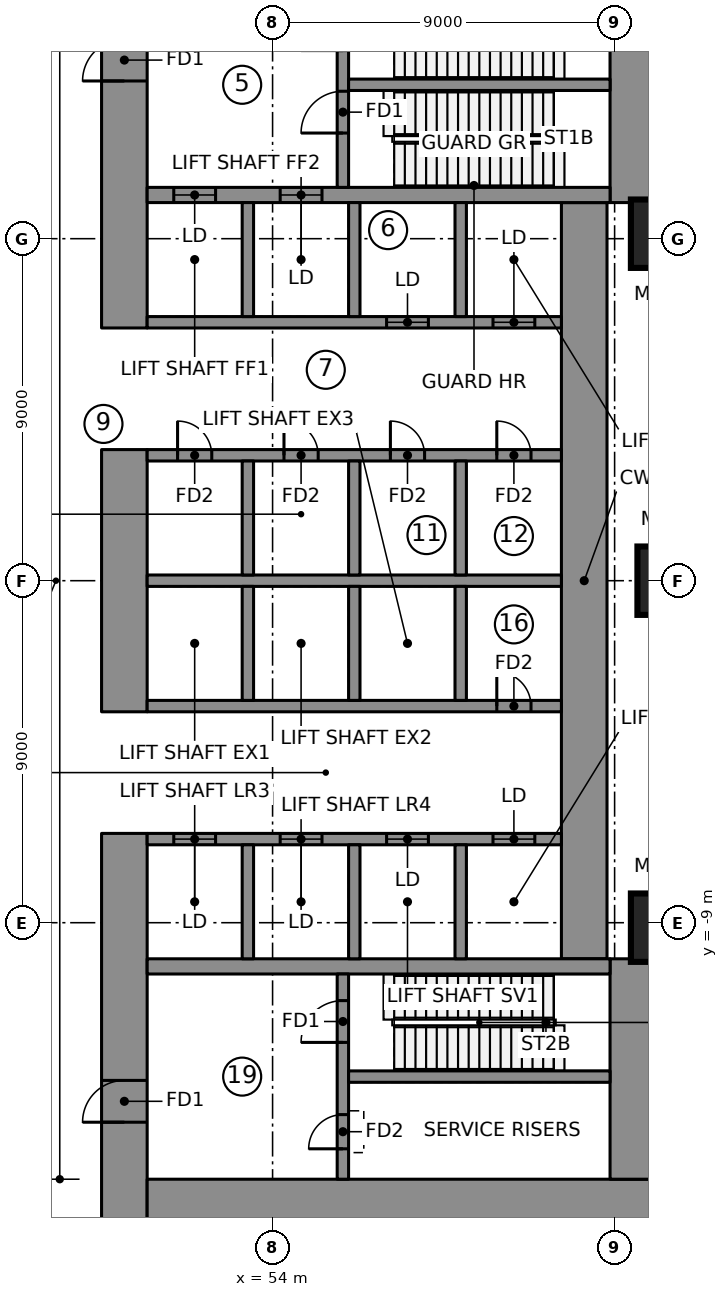
"""IFC4 building model, lengths in metres.
Left out: names, types, materials, properties, quantities, classifications, styles, units other than length and angle.
Written with IfcOpenShell. Run it as: python <this file> out.ifc"""

import sys

from ifc_helpers import new_model, si_unit, direction, frame, frame_2d, origin, origin_2d, place, context, subcontext, project, spatial, rectangle, extrude, element, fill, save


model = new_model("IFC4")
c1 = context("Model", 3, precision=1e-05, world=origin(), true_north=direction((0.0, 1.0)))
c2 = subcontext(c1, "Body", "Model", "MODEL_VIEW")
j1 = project(units=[si_unit("LENGTHUNIT", "METRE"), si_unit("PLANEANGLEUNIT", "RADIAN")], contexts=[c1])
p1 = place(None, origin())
s1 = spatial("IfcSite", under=j1, at=p1, CompositionType="ELEMENT")
p2 = place(p1, origin())
s2 = spatial("IfcBuilding", under=s1, at=p2, CompositionType="ELEMENT")
p3 = place(p2, frame((0.0, 0.0, 13.5)))
s3 = spatial("IfcBuildingStorey", under=s2, at=p3, CompositionType="ELEMENT", Elevation=13.5)
p4 = place(p3, frame((50.1, 6.65, 0.0), z_axis=(0.0, 0.0, 1.0), x_axis=(0.0, 1.0, 0.0)))
e1 = element("IfcWall", 1, at=p4, inside=s3, PredefinedType="SHEAR", context=c2, shape_type="SweptSolid", body=[
    extrude(rectangle(XDim=10.3, YDim=1.2, at=frame_2d((5.15, 0.0))), origin(), (0.0, 0.0, 1.0), 5.5),
])
p5 = place(p4, frame((6.5, 0.0, 0.0)))
e2 = element("IfcOpeningElement", 2, at=p5, cuts=e1, PredefinedType="OPENING", context=c2, shape_type="SweptSolid", body=[
    extrude(rectangle(XDim=1.1, YDim=2.1, at=frame_2d((0.55, 1.05))), frame((0.0, 0.61, 0.0), z_axis=(0.0, -1.0, 0.0), x_axis=(1.0, 0.0, 0.0)), (0.0, 0.0, 1.0), 1.22),
])
p6 = place(p3, frame((50.1, -3.45, 0.0), z_axis=(0.0, 0.0, 1.0), x_axis=(0.0, 1.0, 0.0)))
e3 = element("IfcWall", 3, at=p6, inside=s3, PredefinedType="SHEAR", context=c2, shape_type="SweptSolid", body=[
    extrude(rectangle(XDim=6.9, YDim=1.2, at=frame_2d((3.45, 0.0))), origin(), (0.0, 0.0, 1.0), 5.5),
])
p7 = place(p3, frame((50.1, -16.95, 0.0), z_axis=(0.0, 0.0, 1.0), x_axis=(0.0, 1.0, 0.0)))
e4 = element("IfcWall", 4, at=p7, inside=s3, PredefinedType="SHEAR", context=c2, shape_type="SweptSolid", body=[
    extrude(rectangle(XDim=10.3, YDim=1.2, at=frame_2d((5.15, 0.0))), origin(), (0.0, 0.0, 1.0), 5.5),
])
p8 = place(p7, frame((2.7, 0.0, 0.0)))
e5 = element("IfcOpeningElement", 5, at=p8, cuts=e4, PredefinedType="OPENING", context=c2, shape_type="SweptSolid", body=[
    extrude(rectangle(XDim=1.1, YDim=2.1, at=frame_2d((0.55, 1.05))), frame((0.0, 0.61, 0.0), z_axis=(0.0, -1.0, 0.0), x_axis=(1.0, 0.0, 0.0)), (0.0, 0.0, 1.0), 1.22),
])
p9 = place(p3, frame((50.7, -16.35, 0.0), z_axis=(0.0, 0.0, 1.0), x_axis=(1.0, 0.0, 0.0)))
e6 = element("IfcWall", 6, at=p9, inside=s3, PredefinedType="SHEAR", context=c2, shape_type="SweptSolid", body=[
    extrude(rectangle(XDim=13.38, YDim=1.2, at=frame_2d((6.69, 0.0))), origin(), (0.0, 0.0, 1.0), 5.5),
])
for number, where, z_axis, x_axis in (
    (7, (63.48, 9.95, 0.0), (0.0, 0.0, 1.0), (0.0, 1.0, 0.0)),
    (8, (63.48, -15.75, 0.0), (0.0, 0.0, 1.0), (0.0, 1.0, 0.0)),
):
    element("IfcWall", number, at=place(p3, frame(where, z_axis=z_axis, x_axis=x_axis)), inside=s3, PredefinedType="SHEAR", context=c2, shape_type="SweptSolid", body=[
        extrude(rectangle(XDim=5.8, YDim=1.2, at=frame_2d((2.9, 0.0))), origin(), (0.0, 0.0, 1.0), 5.5),
    ])
p10 = place(p3, frame((62.2, -9.95, 0.0), z_axis=(0.0, 0.0, 1.0), x_axis=(0.0, 1.0, 0.0)))
e9 = element("IfcWall", 9, at=p10, inside=s3, PredefinedType="SHEAR", context=c2, shape_type="SweptSolid", body=[
    extrude(rectangle(XDim=19.9, YDim=1.2, at=frame_2d((9.95, 0.0))), origin(), (0.0, 0.0, 1.0), 5.5),
])
p11 = place(p3, frame((50.7, 10.15, 0.0), z_axis=(0.0, 0.0, 1.0), x_axis=(1.0, 0.0, 0.0)))
e10 = element("IfcWall", 10, at=p11, inside=s3, PredefinedType="SHEAR", context=c2, shape_type="SweptSolid", body=[
    extrude(rectangle(XDim=12.18, YDim=0.4, at=frame_2d((6.09, 0.0))), origin(), (0.0, 0.0, 1.0), 5.5),
])
p12 = place(p11, frame((0.7, 0.0, 0.0)))
e11 = element("IfcOpeningElement", 11, at=p12, cuts=e10, PredefinedType="OPENING", context=c2, shape_type="SweptSolid", body=[
    extrude(rectangle(XDim=1.1, YDim=2.1, at=frame_2d((0.55, 1.05))), frame((0.0, 0.21, 0.0), z_axis=(0.0, -1.0, 0.0), x_axis=(1.0, 0.0, 0.0)), (0.0, 0.0, 1.0), 0.42),
])
p13 = place(p11, frame((3.5, 0.0, 0.0)))
e12 = element("IfcOpeningElement", 12, at=p13, cuts=e10, PredefinedType="OPENING", context=c2, shape_type="SweptSolid", body=[
    extrude(rectangle(XDim=1.1, YDim=2.1, at=frame_2d((0.55, 1.05))), frame((0.0, 0.21, 0.0), z_axis=(0.0, -1.0, 0.0), x_axis=(1.0, 0.0, 0.0)), (0.0, 0.0, 1.0), 0.42),
])
p14 = place(p3, frame((50.7, -10.15, 0.0), z_axis=(0.0, 0.0, 1.0), x_axis=(1.0, 0.0, 0.0)))
e13 = element("IfcWall", 13, at=p14, inside=s3, PredefinedType="SHEAR", context=c2, shape_type="SweptSolid", body=[
    extrude(rectangle(XDim=12.18, YDim=0.4, at=frame_2d((6.09, 0.0))), origin(), (0.0, 0.0, 1.0), 5.5),
])
p15 = place(p3, frame((50.7, 0.0, 0.0), z_axis=(0.0, 0.0, 1.0), x_axis=(1.0, 0.0, 0.0)))
e14 = element("IfcWall", 14, at=p15, inside=s3, PredefinedType="SHEAR", context=c2, shape_type="SweptSolid", body=[
    extrude(rectangle(XDim=10.9, YDim=0.3, at=frame_2d((5.45, 0.0))), origin(), (0.0, 0.0, 1.0), 5.5),
])
p16 = place(p3, frame((50.7, 3.3, 0.0), z_axis=(0.0, 0.0, 1.0), x_axis=(1.0, 0.0, 0.0)))
e15 = element("IfcWall", 15, at=p16, inside=s3, PredefinedType="SHEAR", context=c2, shape_type="SweptSolid", body=[
    extrude(rectangle(XDim=10.9, YDim=0.3, at=frame_2d((5.45, 0.0))), origin(), (0.0, 0.0, 1.0), 5.5),
])
p17 = place(p16, frame((0.8, 0.0, 0.0)))
e16 = element("IfcOpeningElement", 16, at=p17, cuts=e15, PredefinedType="OPENING", context=c2, shape_type="SweptSolid", body=[
    extrude(rectangle(XDim=0.9, YDim=2.1, at=frame_2d((0.45, 1.05))), frame((0.0, 0.16, 0.0), z_axis=(0.0, -1.0, 0.0), x_axis=(1.0, 0.0, 0.0)), (0.0, 0.0, 1.0), 0.32),
])
p18 = place(p16, frame((3.6, 0.0, 0.0)))
e17 = element("IfcOpeningElement", 17, at=p18, cuts=e15, PredefinedType="OPENING", context=c2, shape_type="SweptSolid", body=[
    extrude(rectangle(XDim=0.9, YDim=2.1, at=frame_2d((0.45, 1.05))), frame((0.0, 0.16, 0.0), z_axis=(0.0, -1.0, 0.0), x_axis=(1.0, 0.0, 0.0)), (0.0, 0.0, 1.0), 0.32),
])
p19 = place(p16, frame((6.4, 0.0, 0.0)))
e18 = element("IfcOpeningElement", 18, at=p19, cuts=e15, PredefinedType="OPENING", context=c2, shape_type="SweptSolid", body=[
    extrude(rectangle(XDim=0.9, YDim=2.1, at=frame_2d((0.45, 1.05))), frame((0.0, 0.16, 0.0), z_axis=(0.0, -1.0, 0.0), x_axis=(1.0, 0.0, 0.0)), (0.0, 0.0, 1.0), 0.32),
])
p20 = place(p16, frame((9.2, 0.0, 0.0)))
e19 = element("IfcOpeningElement", 19, at=p20, cuts=e15, PredefinedType="OPENING", context=c2, shape_type="SweptSolid", body=[
    extrude(rectangle(XDim=0.9, YDim=2.1, at=frame_2d((0.45, 1.05))), frame((0.0, 0.16, 0.0), z_axis=(0.0, -1.0, 0.0), x_axis=(1.0, 0.0, 0.0)), (0.0, 0.0, 1.0), 0.32),
])
p21 = place(p3, frame((50.7, 6.8, 0.0), z_axis=(0.0, 0.0, 1.0), x_axis=(1.0, 0.0, 0.0)))
e20 = element("IfcWall", 20, at=p21, inside=s3, PredefinedType="SHEAR", context=c2, shape_type="SweptSolid", body=[
    extrude(rectangle(XDim=10.9, YDim=0.3, at=frame_2d((5.45, 0.0))), origin(), (0.0, 0.0, 1.0), 5.5),
])
p22 = place(p21, frame((6.3, 0.0, 0.0)))
e21 = element("IfcOpeningElement", 21, at=p22, cuts=e20, PredefinedType="OPENING", context=c2, shape_type="SweptSolid", body=[
    extrude(rectangle(XDim=1.1, YDim=2.1, at=frame_2d((0.55, 1.05))), frame((0.0, 0.16, 0.0), z_axis=(0.0, -1.0, 0.0), x_axis=(1.0, 0.0, 0.0)), (0.0, 0.0, 1.0), 0.32),
])
p23 = place(p21, frame((9.1, 0.0, 0.0)))
e22 = element("IfcOpeningElement", 22, at=p23, cuts=e20, PredefinedType="OPENING", context=c2, shape_type="SweptSolid", body=[
    extrude(rectangle(XDim=1.1, YDim=2.1, at=frame_2d((0.55, 1.05))), frame((0.0, 0.16, 0.0), z_axis=(0.0, -1.0, 0.0), x_axis=(1.0, 0.0, 0.0)), (0.0, 0.0, 1.0), 0.32),
])
for number, where, z_axis, x_axis in (
    (23, (53.35, 0.15, 0.0), (0.0, 0.0, 1.0), (0.0, 1.0, 0.0)),
    (24, (53.35, 6.95, 0.0), (0.0, 0.0, 1.0), (0.0, 1.0, 0.0)),
    (25, (56.15, 0.15, 0.0), (0.0, 0.0, 1.0), (0.0, 1.0, 0.0)),
    (26, (56.15, 6.95, 0.0), (0.0, 0.0, 1.0), (0.0, 1.0, 0.0)),
    (27, (58.95, 0.15, 0.0), (0.0, 0.0, 1.0), (0.0, 1.0, 0.0)),
    (28, (58.95, 6.95, 0.0), (0.0, 0.0, 1.0), (0.0, 1.0, 0.0)),
):
    element("IfcWall", number, at=place(p3, frame(where, z_axis=z_axis, x_axis=x_axis)), inside=s3, PredefinedType="SHEAR", context=c2, shape_type="SweptSolid", body=[
        extrude(rectangle(XDim=3.0, YDim=0.3, at=frame_2d((1.5, 0.0))), origin(), (0.0, 0.0, 1.0), 5.5),
    ])
p24 = place(p3, frame((50.7, -3.3, 0.0), z_axis=(0.0, 0.0, 1.0), x_axis=(1.0, 0.0, 0.0)))
e29 = element("IfcWall", 29, at=p24, inside=s3, PredefinedType="SHEAR", context=c2, shape_type="SweptSolid", body=[
    extrude(rectangle(XDim=10.9, YDim=0.3, at=frame_2d((5.45, 0.0))), origin(), (0.0, 0.0, 1.0), 5.5),
])
p25 = place(p24, frame((9.2, 0.0, 0.0)))
e30 = element("IfcOpeningElement", 30, at=p25, cuts=e29, PredefinedType="OPENING", context=c2, shape_type="SweptSolid", body=[
    extrude(rectangle(XDim=0.9, YDim=2.1, at=frame_2d((0.45, 1.05))), frame((0.0, 0.16, 0.0), z_axis=(0.0, -1.0, 0.0), x_axis=(1.0, 0.0, 0.0)), (0.0, 0.0, 1.0), 0.32),
])
p26 = place(p3, frame((50.7, -6.8, 0.0), z_axis=(0.0, 0.0, 1.0), x_axis=(1.0, 0.0, 0.0)))
e31 = element("IfcWall", 31, at=p26, inside=s3, PredefinedType="SHEAR", context=c2, shape_type="SweptSolid", body=[
    extrude(rectangle(XDim=10.9, YDim=0.3, at=frame_2d((5.45, 0.0))), origin(), (0.0, 0.0, 1.0), 5.5),
])
p27 = place(p26, frame((0.7, 0.0, 0.0)))
e32 = element("IfcOpeningElement", 32, at=p27, cuts=e31, PredefinedType="OPENING", context=c2, shape_type="SweptSolid", body=[
    extrude(rectangle(XDim=1.1, YDim=2.1, at=frame_2d((0.55, 1.05))), frame((0.0, 0.16, 0.0), z_axis=(0.0, -1.0, 0.0), x_axis=(1.0, 0.0, 0.0)), (0.0, 0.0, 1.0), 0.32),
])
p28 = place(p26, frame((3.5, 0.0, 0.0)))
e33 = element("IfcOpeningElement", 33, at=p28, cuts=e31, PredefinedType="OPENING", context=c2, shape_type="SweptSolid", body=[
    extrude(rectangle(XDim=1.1, YDim=2.1, at=frame_2d((0.55, 1.05))), frame((0.0, 0.16, 0.0), z_axis=(0.0, -1.0, 0.0), x_axis=(1.0, 0.0, 0.0)), (0.0, 0.0, 1.0), 0.32),
])
p29 = place(p26, frame((6.3, 0.0, 0.0)))
e34 = element("IfcOpeningElement", 34, at=p29, cuts=e31, PredefinedType="OPENING", context=c2, shape_type="SweptSolid", body=[
    extrude(rectangle(XDim=1.1, YDim=2.1, at=frame_2d((0.55, 1.05))), frame((0.0, 0.16, 0.0), z_axis=(0.0, -1.0, 0.0), x_axis=(1.0, 0.0, 0.0)), (0.0, 0.0, 1.0), 0.32),
])
p30 = place(p26, frame((9.1, 0.0, 0.0)))
e35 = element("IfcOpeningElement", 35, at=p30, cuts=e31, PredefinedType="OPENING", context=c2, shape_type="SweptSolid", body=[
    extrude(rectangle(XDim=1.1, YDim=2.1, at=frame_2d((0.55, 1.05))), frame((0.0, 0.16, 0.0), z_axis=(0.0, -1.0, 0.0), x_axis=(1.0, 0.0, 0.0)), (0.0, 0.0, 1.0), 0.32),
])
for number, where, z_axis, x_axis in (
    (36, (53.35, -3.15, 0.0), (0.0, 0.0, 1.0), (0.0, 1.0, 0.0)),
    (37, (53.35, -9.95, 0.0), (0.0, 0.0, 1.0), (0.0, 1.0, 0.0)),
    (38, (56.15, -3.15, 0.0), (0.0, 0.0, 1.0), (0.0, 1.0, 0.0)),
    (39, (56.15, -9.95, 0.0), (0.0, 0.0, 1.0), (0.0, 1.0, 0.0)),
    (40, (58.95, -3.15, 0.0), (0.0, 0.0, 1.0), (0.0, 1.0, 0.0)),
    (41, (58.95, -9.95, 0.0), (0.0, 0.0, 1.0), (0.0, 1.0, 0.0)),
):
    element("IfcWall", number, at=place(p3, frame(where, z_axis=z_axis, x_axis=x_axis)), inside=s3, PredefinedType="SHEAR", context=c2, shape_type="SweptSolid", body=[
        extrude(rectangle(XDim=3.0, YDim=0.3, at=frame_2d((1.5, 0.0))), origin(), (0.0, 0.0, 1.0), 5.5),
    ])
p31 = place(p3, frame((55.85, 10.35, 0.0), z_axis=(0.0, 0.0, 1.0), x_axis=(0.0, 1.0, 0.0)))
e42 = element("IfcWall", 42, at=p31, inside=s3, PredefinedType="SHEAR", context=c2, shape_type="SweptSolid", body=[
    extrude(rectangle(XDim=5.4, YDim=0.3, at=frame_2d((2.7, 0.0))), origin(), (0.0, 0.0, 1.0), 5.5),
])
p32 = place(p31, frame((1.43, 0.0, 0.0)))
e43 = element("IfcOpeningElement", 43, at=p32, cuts=e42, PredefinedType="OPENING", context=c2, shape_type="SweptSolid", body=[
    extrude(rectangle(XDim=1.1, YDim=2.1, at=frame_2d((0.55, 1.05))), frame((0.0, 0.16, 0.0), z_axis=(0.0, -1.0, 0.0), x_axis=(1.0, 0.0, 0.0)), (0.0, 0.0, 1.0), 0.32),
])
p33 = place(p31, frame((3.6, 0.0, 0.0)))
e44 = element("IfcOpeningElement", 44, at=p33, cuts=e42, PredefinedType="OPENING", context=c2, shape_type="SweptSolid", body=[
    extrude(rectangle(XDim=1.1, YDim=2.1, at=frame_2d((0.55, 1.05))), frame((0.0, 0.16, 0.0), z_axis=(0.0, -1.0, 0.0), x_axis=(1.0, 0.0, 0.0)), (0.0, 0.0, 1.0), 0.32),
])
p34 = place(p3, frame((55.85, -15.75, 0.0), z_axis=(0.0, 0.0, 1.0), x_axis=(0.0, 1.0, 0.0)))
e45 = element("IfcWall", 45, at=p34, inside=s3, PredefinedType="SHEAR", context=c2, shape_type="SweptSolid", body=[
    extrude(rectangle(XDim=5.4, YDim=0.3, at=frame_2d((2.7, 0.0))), origin(), (0.0, 0.0, 1.0), 5.5),
])
p35 = place(p34, frame((3.6, 0.0, 0.0)))
e46 = element("IfcOpeningElement", 46, at=p35, cuts=e45, PredefinedType="OPENING", context=c2, shape_type="SweptSolid", body=[
    extrude(rectangle(XDim=1.1, YDim=2.1, at=frame_2d((0.55, 1.05))), frame((0.0, 0.16, 0.0), z_axis=(0.0, -1.0, 0.0), x_axis=(1.0, 0.0, 0.0)), (0.0, 0.0, 1.0), 0.32),
])
p36 = place(p34, frame((0.8, 0.0, 0.0)))
e47 = element("IfcOpeningElement", 47, at=p36, cuts=e45, PredefinedType="OPENING", context=c2, shape_type="SweptSolid", body=[
    extrude(rectangle(XDim=0.9, YDim=2.1, at=frame_2d((0.45, 1.05))), frame((0.0, 0.16, 0.0), z_axis=(0.0, -1.0, 0.0), x_axis=(1.0, 0.0, 0.0)), (0.0, 0.0, 1.0), 0.32),
])
for number, where, z_axis, x_axis in (
    (48, (56.0, 13.05, 0.0), (0.0, 0.0, 1.0), (1.0, 0.0, 0.0)),
    (49, (56.0, -13.05, 0.0), (0.0, 0.0, 1.0), (1.0, 0.0, 0.0)),
):
    element("IfcWall", number, at=place(p3, frame(where, z_axis=z_axis, x_axis=x_axis)), inside=s3, PredefinedType="SHEAR", context=c2, shape_type="SweptSolid", body=[
        extrude(rectangle(XDim=6.88, YDim=0.3, at=frame_2d((3.44, 0.0))), origin(), (0.0, 0.0, 1.0), 5.5),
    ])
for number, where, z_axis, x_axis in (
    (50, (64.328, -9.131, 0.0), (0.0, 0.0, 1.0), (1.0, 0.0, 0.0)),
    (51, (64.5, 0.0, 0.0), (0.0, 0.0, 1.0), (1.0, 0.0, 0.0)),
    (52, (64.328, 9.131, 0.0), (0.0, 0.0, 1.0), (1.0, 0.0, 0.0)),
):
    element("IfcColumn", number, at=place(p3, frame(where, z_axis=z_axis, x_axis=x_axis)), inside=s3, PredefinedType="COLUMN", context=c2, shape_type="SweptSolid", body=[
        extrude(rectangle(XDim=1.8, YDim=1.8, at=origin_2d()), origin(), (0.0, 0.0, 1.0), 5.5),
    ])
p37 = place(p12, origin())
e53 = element("IfcDoor", 53, at=p37, inside=s3, OperationType="DOUBLE_DOOR_SLIDING", PredefinedType="DOOR", context=c2, shape_type="SweptSolid", body=[
    extrude(rectangle(XDim=1.1, YDim=2.1, at=frame_2d((0.55, 1.05))), frame((0.0, 0.025, 0.0), z_axis=(0.0, -1.0, 0.0), x_axis=(1.0, 0.0, 0.0)), (0.0, 0.0, 1.0), 0.05),
])
fill(e11, e53)
p38 = place(p13, origin())
e54 = element("IfcDoor", 54, at=p38, inside=s3, OperationType="DOUBLE_DOOR_SLIDING", PredefinedType="DOOR", context=c2, shape_type="SweptSolid", body=[
    extrude(rectangle(XDim=1.1, YDim=2.1, at=frame_2d((0.55, 1.05))), frame((0.0, 0.025, 0.0), z_axis=(0.0, -1.0, 0.0), x_axis=(1.0, 0.0, 0.0)), (0.0, 0.0, 1.0), 0.05),
])
fill(e12, e54)
p39 = place(p22, origin())
e55 = element("IfcDoor", 55, at=p39, inside=s3, OperationType="DOUBLE_DOOR_SLIDING", PredefinedType="DOOR", context=c2, shape_type="SweptSolid", body=[
    extrude(rectangle(XDim=1.1, YDim=2.1, at=frame_2d((0.55, 1.05))), frame((0.0, 0.025, 0.0), z_axis=(0.0, -1.0, 0.0), x_axis=(1.0, 0.0, 0.0)), (0.0, 0.0, 1.0), 0.05),
])
fill(e21, e55)
p40 = place(p23, origin())
e56 = element("IfcDoor", 56, at=p40, inside=s3, OperationType="DOUBLE_DOOR_SLIDING", PredefinedType="DOOR", context=c2, shape_type="SweptSolid", body=[
    extrude(rectangle(XDim=1.1, YDim=2.1, at=frame_2d((0.55, 1.05))), frame((0.0, 0.025, 0.0), z_axis=(0.0, -1.0, 0.0), x_axis=(1.0, 0.0, 0.0)), (0.0, 0.0, 1.0), 0.05),
])
fill(e22, e56)
p41 = place(p27, origin())
e57 = element("IfcDoor", 57, at=p41, inside=s3, OperationType="DOUBLE_DOOR_SLIDING", PredefinedType="DOOR", context=c2, shape_type="SweptSolid", body=[
    extrude(rectangle(XDim=1.1, YDim=2.1, at=frame_2d((0.55, 1.05))), frame((0.0, 0.025, 0.0), z_axis=(0.0, -1.0, 0.0), x_axis=(1.0, 0.0, 0.0)), (0.0, 0.0, 1.0), 0.05),
])
fill(e32, e57)
p42 = place(p28, origin())
e58 = element("IfcDoor", 58, at=p42, inside=s3, OperationType="DOUBLE_DOOR_SLIDING", PredefinedType="DOOR", context=c2, shape_type="SweptSolid", body=[
    extrude(rectangle(XDim=1.1, YDim=2.1, at=frame_2d((0.55, 1.05))), frame((0.0, 0.025, 0.0), z_axis=(0.0, -1.0, 0.0), x_axis=(1.0, 0.0, 0.0)), (0.0, 0.0, 1.0), 0.05),
])
fill(e33, e58)
p43 = place(p29, origin())
e59 = element("IfcDoor", 59, at=p43, inside=s3, OperationType="DOUBLE_DOOR_SLIDING", PredefinedType="DOOR", context=c2, shape_type="SweptSolid", body=[
    extrude(rectangle(XDim=1.1, YDim=2.1, at=frame_2d((0.55, 1.05))), frame((0.0, 0.025, 0.0), z_axis=(0.0, -1.0, 0.0), x_axis=(1.0, 0.0, 0.0)), (0.0, 0.0, 1.0), 0.05),
])
fill(e34, e59)
p44 = place(p30, origin())
e60 = element("IfcDoor", 60, at=p44, inside=s3, OperationType="DOUBLE_DOOR_SLIDING", PredefinedType="DOOR", context=c2, shape_type="SweptSolid", body=[
    extrude(rectangle(XDim=1.1, YDim=2.1, at=frame_2d((0.55, 1.05))), frame((0.0, 0.025, 0.0), z_axis=(0.0, -1.0, 0.0), x_axis=(1.0, 0.0, 0.0)), (0.0, 0.0, 1.0), 0.05),
])
fill(e35, e60)
p45 = place(p32, origin())
e61 = element("IfcDoor", 61, at=p45, inside=s3, OperationType="SINGLE_SWING_RIGHT", PredefinedType="DOOR", context=c2, shape_type="SweptSolid", body=[
    extrude(rectangle(XDim=1.1, YDim=2.1, at=frame_2d((0.55, 1.05))), frame((0.0, 0.025, 0.0), z_axis=(0.0, -1.0, 0.0), x_axis=(1.0, 0.0, 0.0)), (0.0, 0.0, 1.0), 0.05),
])
fill(e43, e61)
p46 = place(p35, origin())
e62 = element("IfcDoor", 62, at=p46, inside=s3, OperationType="SINGLE_SWING_RIGHT", PredefinedType="DOOR", context=c2, shape_type="SweptSolid", body=[
    extrude(rectangle(XDim=1.1, YDim=2.1, at=frame_2d((0.55, 1.05))), frame((0.0, 0.025, 0.0), z_axis=(0.0, -1.0, 0.0), x_axis=(1.0, 0.0, 0.0)), (0.0, 0.0, 1.0), 0.05),
])
fill(e46, e62)
p47 = place(p5, origin())
e63 = element("IfcDoor", 63, at=p47, inside=s3, OperationType="SINGLE_SWING_RIGHT", PredefinedType="DOOR", context=c2, shape_type="SweptSolid", body=[
    extrude(rectangle(XDim=1.1, YDim=2.1, at=frame_2d((0.55, 1.05))), frame((0.0, 0.025, 0.0), z_axis=(0.0, -1.0, 0.0), x_axis=(1.0, 0.0, 0.0)), (0.0, 0.0, 1.0), 0.05),
])
fill(e2, e63)
p48 = place(p8, origin())
e64 = element("IfcDoor", 64, at=p48, inside=s3, OperationType="SINGLE_SWING_RIGHT", PredefinedType="DOOR", context=c2, shape_type="SweptSolid", body=[
    extrude(rectangle(XDim=1.1, YDim=2.1, at=frame_2d((0.55, 1.05))), frame((0.0, 0.025, 0.0), z_axis=(0.0, -1.0, 0.0), x_axis=(1.0, 0.0, 0.0)), (0.0, 0.0, 1.0), 0.05),
])
fill(e5, e64)
p49 = place(p36, origin())
e65 = element("IfcDoor", 65, at=p49, inside=s3, OperationType="SINGLE_SWING_LEFT", PredefinedType="DOOR", context=c2, shape_type="SweptSolid", body=[
    extrude(rectangle(XDim=0.9, YDim=2.1, at=frame_2d((0.45, 1.05))), frame((0.0, 0.025, 0.0), z_axis=(0.0, -1.0, 0.0), x_axis=(1.0, 0.0, 0.0)), (0.0, 0.0, 1.0), 0.05),
])
fill(e47, e65)
p50 = place(p17, origin())
e66 = element("IfcDoor", 66, at=p50, inside=s3, OperationType="SINGLE_SWING_LEFT", PredefinedType="DOOR", context=c2, shape_type="SweptSolid", body=[
    extrude(rectangle(XDim=0.9, YDim=2.1, at=frame_2d((0.45, 1.05))), frame((0.0, 0.025, 0.0), z_axis=(0.0, -1.0, 0.0), x_axis=(1.0, 0.0, 0.0)), (0.0, 0.0, 1.0), 0.05),
])
fill(e16, e66)
p51 = place(p18, origin())
e67 = element("IfcDoor", 67, at=p51, inside=s3, OperationType="SINGLE_SWING_LEFT", PredefinedType="DOOR", context=c2, shape_type="SweptSolid", body=[
    extrude(rectangle(XDim=0.9, YDim=2.1, at=frame_2d((0.45, 1.05))), frame((0.0, 0.025, 0.0), z_axis=(0.0, -1.0, 0.0), x_axis=(1.0, 0.0, 0.0)), (0.0, 0.0, 1.0), 0.05),
])
fill(e17, e67)
p52 = place(p19, origin())
e68 = element("IfcDoor", 68, at=p52, inside=s3, OperationType="SINGLE_SWING_LEFT", PredefinedType="DOOR", context=c2, shape_type="SweptSolid", body=[
    extrude(rectangle(XDim=0.9, YDim=2.1, at=frame_2d((0.45, 1.05))), frame((0.0, 0.025, 0.0), z_axis=(0.0, -1.0, 0.0), x_axis=(1.0, 0.0, 0.0)), (0.0, 0.0, 1.0), 0.05),
])
fill(e18, e68)
p53 = place(p20, origin())
e69 = element("IfcDoor", 69, at=p53, inside=s3, OperationType="SINGLE_SWING_LEFT", PredefinedType="DOOR", context=c2, shape_type="SweptSolid", body=[
    extrude(rectangle(XDim=0.9, YDim=2.1, at=frame_2d((0.45, 1.05))), frame((0.0, 0.025, 0.0), z_axis=(0.0, -1.0, 0.0), x_axis=(1.0, 0.0, 0.0)), (0.0, 0.0, 1.0), 0.05),
])
fill(e19, e69)
p54 = place(p25, origin())
e70 = element("IfcDoor", 70, at=p54, inside=s3, OperationType="SINGLE_SWING_LEFT", PredefinedType="DOOR", context=c2, shape_type="SweptSolid", body=[
    extrude(rectangle(XDim=0.9, YDim=2.1, at=frame_2d((0.45, 1.05))), frame((0.0, 0.025, 0.0), z_axis=(0.0, -1.0, 0.0), x_axis=(1.0, 0.0, 0.0)), (0.0, 0.0, 1.0), 0.05),
])
fill(e30, e70)
save(model, sys.argv[1])
